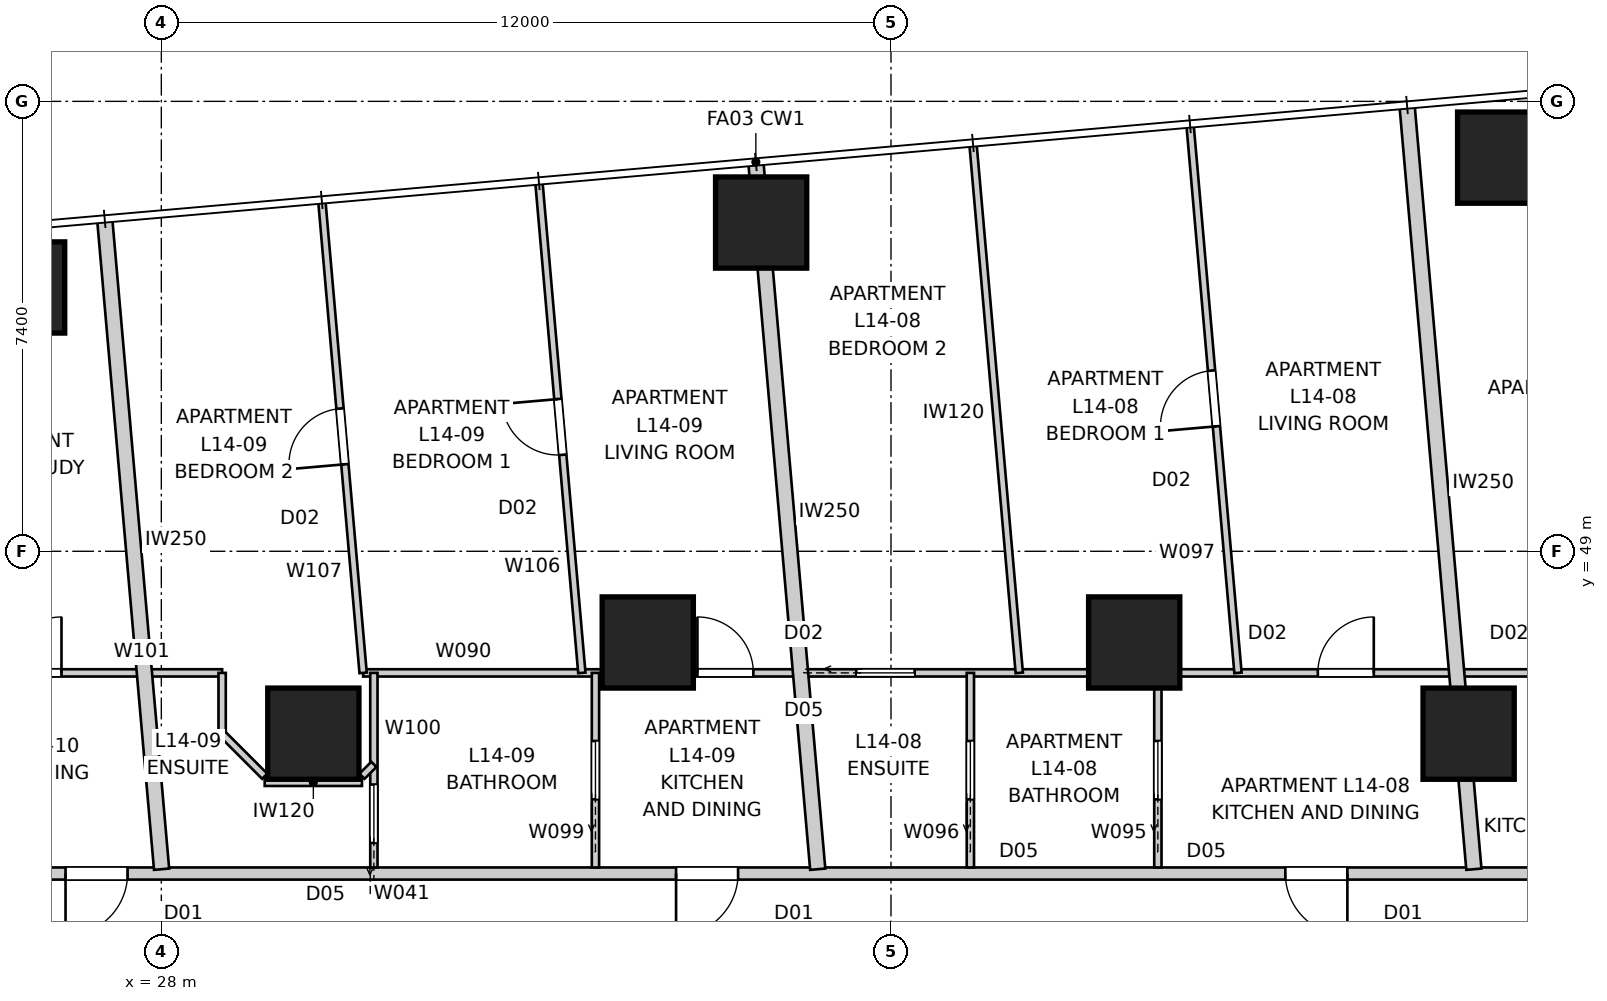
"""IFC4 building model, lengths in metres.
Left out: names, types, materials, properties, quantities, classifications, styles, units other than length and angle.
Written with IfcOpenShell. Run it as: python <this file> out.ifc"""

import sys

from ifc_helpers import new_model, si_unit, direction, frame, frame_2d, origin, origin_2d, place, context, subcontext, project, spatial, rectangle, extrude, element, fill, save


model = new_model("IFC4")
c1 = context("Model", 3, precision=1e-05, world=origin(), true_north=direction((0.0, 1.0)))
c2 = subcontext(c1, "Body", "Model", "MODEL_VIEW")
j1 = project(units=[si_unit("LENGTHUNIT", "METRE"), si_unit("PLANEANGLEUNIT", "RADIAN")], contexts=[c1])
p1 = place(None, origin())
s1 = spatial("IfcSite", under=j1, at=p1, CompositionType="ELEMENT")
p2 = place(p1, origin())
s2 = spatial("IfcBuilding", under=s1, at=p2, CompositionType="ELEMENT")
p3 = place(p2, frame((0.0, 0.0, 54.0)))
s3 = spatial("IfcBuildingStorey", under=s2, at=p3, CompositionType="ELEMENT", Elevation=54.0)
for number, where, z_axis, x_axis in (
    (1, (50.068, 55.474, 0.0), (0.0, 0.0, 1.0), (1.0, 0.0, 0.0)),
    (2, (37.865, 54.407, 0.0), (0.0, 0.0, 1.0), (1.0, 0.0, 0.0)),
    (3, (25.661, 53.339, 0.0), (0.0, 0.0, 1.0), (1.0, 0.0, 0.0)),
    (4, (49.5, 46.0, 0.0), (0.0, 0.0, 1.0), (1.0, 0.0, 0.0)),
    (5, (44.0, 47.5, 0.0), (0.0, 0.0, 1.0), (1.0, 0.0, 0.0)),
    (6, (36.0, 47.5, 0.0), (0.0, 0.0, 1.0), (1.0, 0.0, 0.0)),
    (7, (30.5, 46.0, 0.0), (0.0, 0.0, 1.0), (1.0, 0.0, 0.0)),
):
    element("IfcColumn", number, at=place(p3, frame(where, z_axis=z_axis, x_axis=x_axis)), inside=s3, PredefinedType="COLUMN", context=c2, shape_type="SweptSolid", body=[
        extrude(rectangle(XDim=1.5, YDim=1.5, at=origin_2d()), origin(), (0.0, 0.0, 1.0), 3.4),
    ])
p4 = place(p3, frame((53.7, 43.7, 0.0), z_axis=(0.0, 0.0, 1.0), x_axis=(-1.0, 0.0, 0.0)))
e8 = element("IfcWall", 8, at=p4, inside=s3, PredefinedType="PARTITIONING", context=c2, shape_type="SweptSolid", body=[
    extrude(rectangle(XDim=28.2, YDim=0.2, at=frame_2d((14.1, 0.0))), origin(), (0.0, 0.0, 1.0), 3.25),
])
p5 = place(p4, frame((6.194, 0.0, 0.0)))
e9 = element("IfcOpeningElement", 9, at=p5, cuts=e8, PredefinedType="OPENING", context=c2, shape_type="SweptSolid", body=[
    extrude(rectangle(XDim=1.02, YDim=2.34, at=frame_2d((0.51, 1.17))), frame((0.0, 0.11, 0.0), z_axis=(0.0, -1.0, 0.0), x_axis=(1.0, 0.0, 0.0)), (0.0, 0.0, 1.0), 0.22),
])
p6 = place(p4, frame((1.715, 0.0, 0.0)))
e10 = element("IfcOpeningElement", 10, at=p6, cuts=e8, PredefinedType="OPENING", context=c2, shape_type="SweptSolid", body=[
    extrude(rectangle(XDim=1.02, YDim=2.1, at=frame_2d((0.51, 1.05))), frame((0.0, 0.11, 0.0), z_axis=(0.0, -1.0, 0.0), x_axis=(1.0, 0.0, 0.0)), (0.0, 0.0, 1.0), 0.22),
])
p7 = place(p4, frame((16.215, 0.0, 0.0)))
e11 = element("IfcOpeningElement", 11, at=p7, cuts=e8, PredefinedType="OPENING", context=c2, shape_type="SweptSolid", body=[
    extrude(rectangle(XDim=1.02, YDim=2.34, at=frame_2d((0.51, 1.17))), frame((0.0, 0.11, 0.0), z_axis=(0.0, -1.0, 0.0), x_axis=(1.0, 0.0, 0.0)), (0.0, 0.0, 1.0), 0.22),
])
p8 = place(p4, frame((26.255, 0.0, 0.0)))
e12 = element("IfcOpeningElement", 12, at=p8, cuts=e8, PredefinedType="OPENING", context=c2, shape_type="SweptSolid", body=[
    extrude(rectangle(XDim=1.02, YDim=2.34, at=frame_2d((0.51, 1.17))), frame((0.0, 0.11, 0.0), z_axis=(0.0, -1.0, 0.0), x_axis=(1.0, 0.0, 0.0)), (0.0, 0.0, 1.0), 0.22),
])
p9 = place(p3, frame((37.778, 55.403, 0.0), z_axis=(0.0, 0.0, 1.0), x_axis=(0.087147497287, -0.996195419442, 0.0)))
e13 = element("IfcWall", 13, at=p9, inside=s3, PredefinedType="PARTITIONING", context=c2, shape_type="SweptSolid", body=[
    extrude(rectangle(XDim=11.677, YDim=0.25, at=frame_2d((5.838, 0.0))), origin(), (0.0, 0.0, 1.0), 3.25),
])
p10 = place(p3, frame((48.487, 56.34, 0.0), z_axis=(0.0, 0.0, 1.0), x_axis=(0.087153988028, -0.996194851608, 0.0)))
e14 = element("IfcWall", 14, at=p10, inside=s3, PredefinedType="PARTITIONING", context=c2, shape_type="SweptSolid", body=[
    extrude(rectangle(XDim=12.617, YDim=0.25, at=frame_2d((6.309, 0.0))), origin(), (0.0, 0.0, 1.0), 3.25),
])
p11 = place(p3, frame((27.068, 54.466, 0.0), z_axis=(0.0, 0.0, 1.0), x_axis=(0.08716441141, -0.996193939644, 0.0)))
e15 = element("IfcWall", 15, at=p11, inside=s3, PredefinedType="PARTITIONING", context=c2, shape_type="SweptSolid", body=[
    extrude(rectangle(XDim=10.736, YDim=0.25, at=frame_2d((5.368, 0.0))), origin(), (0.0, 0.0, 1.0), 3.25),
])
p12 = place(p3, frame((31.319, 47.0, 0.0), z_axis=(0.0, 0.0, 1.0), x_axis=(1.0, 0.0, 0.0)))
e16 = element("IfcWall", 16, at=p12, inside=s3, PredefinedType="PARTITIONING", context=c2, shape_type="SweptSolid", body=[
    extrude(rectangle(XDim=25.681, YDim=0.12, at=frame_2d((12.841, 0.0))), origin(), (0.0, 0.0, 1.0), 2.55),
])
p13 = place(p12, frame((15.701, 0.0, 0.0)))
e17 = element("IfcOpeningElement", 17, at=p13, cuts=e16, PredefinedType="OPENING", context=c2, shape_type="SweptSolid", body=[
    extrude(rectangle(XDim=0.92, YDim=2.34, at=frame_2d((0.46, 1.17))), frame((0.0, 0.07, 0.0), z_axis=(0.0, -1.0, 0.0), x_axis=(1.0, 0.0, 0.0)), (0.0, 0.0, 1.0), 0.14),
])
p14 = place(p12, frame((19.676, 0.0, 0.0)))
e18 = element("IfcOpeningElement", 18, at=p14, cuts=e16, PredefinedType="OPENING", context=c2, shape_type="SweptSolid", body=[
    extrude(rectangle(XDim=0.92, YDim=2.34, at=frame_2d((0.46, 1.17))), frame((0.0, 0.07, 0.0), z_axis=(0.0, -1.0, 0.0), x_axis=(1.0, 0.0, 0.0)), (0.0, 0.0, 1.0), 0.14),
])
p15 = place(p12, frame((5.498, 0.0, 0.0)))
e19 = element("IfcOpeningElement", 19, at=p15, cuts=e16, PredefinedType="OPENING", context=c2, shape_type="SweptSolid", body=[
    extrude(rectangle(XDim=0.92, YDim=2.34, at=frame_2d((0.46, 1.17))), frame((0.0, 0.07, 0.0), z_axis=(0.0, -1.0, 0.0), x_axis=(1.0, 0.0, 0.0)), (0.0, 0.0, 1.0), 0.14),
])
p16 = place(p12, frame((8.11, 0.0, 0.0)))
e20 = element("IfcOpeningElement", 20, at=p16, cuts=e16, PredefinedType="OPENING", context=c2, shape_type="SweptSolid", body=[
    extrude(rectangle(XDim=0.96, YDim=2.1, at=frame_2d((0.48, 1.05))), frame((0.0, 0.07, 0.0), z_axis=(0.0, -1.0, 0.0), x_axis=(1.0, 0.0, 0.0)), (0.0, 0.0, 1.0), 0.14),
])
p17 = place(p3, frame((44.389, 43.8, 0.0), z_axis=(0.0, 0.0, 1.0), x_axis=(0.0, 1.0, 0.0)))
e21 = element("IfcWall", 21, at=p17, inside=s3, PredefinedType="PARTITIONING", context=c2, shape_type="SweptSolid", body=[
    extrude(rectangle(XDim=3.2, YDim=0.12, at=frame_2d((1.6, 0.0))), origin(), (0.0, 0.0, 1.0), 3.25),
])
p18 = place(p17, frame((1.12, 0.0, 0.0)))
e22 = element("IfcOpeningElement", 22, at=p18, cuts=e21, PredefinedType="OPENING", context=c2, shape_type="SweptSolid", body=[
    extrude(rectangle(XDim=0.96, YDim=2.1, at=frame_2d((0.48, 1.05))), frame((0.0, 0.07, 0.0), z_axis=(0.0, -1.0, 0.0), x_axis=(1.0, 0.0, 0.0)), (0.0, 0.0, 1.0), 0.14),
])
p19 = place(p3, frame((41.305, 43.8, 0.0), z_axis=(0.0, 0.0, 1.0), x_axis=(0.0, 1.0, 0.0)))
e23 = element("IfcWall", 23, at=p19, inside=s3, PredefinedType="PARTITIONING", context=c2, shape_type="SweptSolid", body=[
    extrude(rectangle(XDim=3.2, YDim=0.12, at=frame_2d((1.6, 0.0))), origin(), (0.0, 0.0, 1.0), 3.25),
])
p20 = place(p19, frame((1.12, 0.0, 0.0)))
e24 = element("IfcOpeningElement", 24, at=p20, cuts=e23, PredefinedType="OPENING", context=c2, shape_type="SweptSolid", body=[
    extrude(rectangle(XDim=0.96, YDim=2.1, at=frame_2d((0.48, 1.05))), frame((0.0, 0.07, 0.0), z_axis=(0.0, -1.0, 0.0), x_axis=(1.0, 0.0, 0.0)), (0.0, 0.0, 1.0), 0.14),
])
p21 = place(p3, frame((45.707, 47.0, 0.0), z_axis=(0.0, 0.0, 1.0), x_axis=(-0.087160907995, 0.996194246178, 0.0)))
e25 = element("IfcWall", 25, at=p21, inside=s3, PredefinedType="PARTITIONING", context=c2, shape_type="SweptSolid", body=[
    extrude(rectangle(XDim=9.022, YDim=0.12, at=frame_2d((4.511, 0.0))), origin(), (0.0, 0.0, 1.0), 3.25),
])
p22 = place(p21, frame((4.071, 0.0, 0.0)))
e26 = element("IfcOpeningElement", 26, at=p22, cuts=e25, PredefinedType="OPENING", context=c2, shape_type="SweptSolid", body=[
    extrude(rectangle(XDim=0.92, YDim=2.34, at=frame_2d((0.46, 1.17))), frame((0.0, 0.07, 0.0), z_axis=(0.0, -1.0, 0.0), x_axis=(1.0, 0.0, 0.0)), (0.0, 0.0, 1.0), 0.14),
])
p23 = place(p3, frame((42.11, 47.0, 0.0), z_axis=(0.0, 0.0, 1.0), x_axis=(-0.087158256162, 0.996194478193, 0.0)))
e27 = element("IfcWall", 27, at=p23, inside=s3, PredefinedType="PARTITIONING", context=c2, shape_type="SweptSolid", body=[
    extrude(rectangle(XDim=8.709, YDim=0.12, at=frame_2d((4.354, 0.0))), origin(), (0.0, 0.0, 1.0), 3.25),
])
p24 = place(p3, frame((35.14, 43.8, 0.0), z_axis=(0.0, 0.0, 1.0), x_axis=(0.0, 1.0, 0.0)))
e28 = element("IfcWall", 28, at=p24, inside=s3, PredefinedType="PARTITIONING", context=c2, shape_type="SweptSolid", body=[
    extrude(rectangle(XDim=3.2, YDim=0.12, at=frame_2d((1.6, 0.0))), origin(), (0.0, 0.0, 1.0), 3.25),
])
p25 = place(p24, frame((1.12, 0.0, 0.0)))
e29 = element("IfcOpeningElement", 29, at=p25, cuts=e28, PredefinedType="OPENING", context=c2, shape_type="SweptSolid", body=[
    extrude(rectangle(XDim=0.96, YDim=2.1, at=frame_2d((0.48, 1.05))), frame((0.0, 0.07, 0.0), z_axis=(0.0, -1.0, 0.0), x_axis=(1.0, 0.0, 0.0)), (0.0, 0.0, 1.0), 0.14),
])
p26 = place(p3, frame((31.496, 43.8, 0.0), z_axis=(0.0, 0.0, 1.0), x_axis=(0.0, 1.0, 0.0)))
e30 = element("IfcWall", 30, at=p26, inside=s3, PredefinedType="PARTITIONING", context=c2, shape_type="SweptSolid", body=[
    extrude(rectangle(XDim=3.2, YDim=0.12, at=frame_2d((1.6, 0.0))), origin(), (0.0, 0.0, 1.0), 3.25),
])
p27 = place(p26, frame((0.403, 0.0, 0.0)))
e31 = element("IfcOpeningElement", 31, at=p27, cuts=e30, PredefinedType="OPENING", context=c2, shape_type="SweptSolid", body=[
    extrude(rectangle(XDim=0.96, YDim=2.1, at=frame_2d((0.48, 1.05))), frame((0.0, 0.07, 0.0), z_axis=(0.0, -1.0, 0.0), x_axis=(1.0, 0.0, 0.0)), (0.0, 0.0, 1.0), 0.14),
])
p28 = place(p3, frame((23.0, 47.0, 0.0), z_axis=(0.0, 0.0, 1.0), x_axis=(1.0, 0.0, 0.0)))
e32 = element("IfcWall", 32, at=p28, inside=s3, PredefinedType="PARTITIONING", context=c2, shape_type="SweptSolid", body=[
    extrude(rectangle(XDim=6.0, YDim=0.12, at=frame_2d((3.0, 0.0))), origin(), (0.0, 0.0, 1.0), 3.25),
])
p29 = place(p28, frame((2.438, 0.0, 0.0)))
e33 = element("IfcOpeningElement", 33, at=p29, cuts=e32, PredefinedType="OPENING", context=c2, shape_type="SweptSolid", body=[
    extrude(rectangle(XDim=0.92, YDim=2.34, at=frame_2d((0.46, 1.17))), frame((0.0, 0.07, 0.0), z_axis=(0.0, -1.0, 0.0), x_axis=(1.0, 0.0, 0.0)), (0.0, 0.0, 1.0), 0.14),
])
p30 = place(p3, frame((29.0, 47.0, 0.0), z_axis=(0.0, 0.0, 1.0), x_axis=(0.0, -1.0, 0.0)))
e34 = element("IfcWall", 34, at=p30, inside=s3, PredefinedType="PARTITIONING", context=c2, shape_type="SweptSolid", body=[
    extrude(rectangle(XDim=1.0, YDim=0.12, at=frame_2d((0.5, 0.0))), origin(), (0.0, 0.0, 1.0), 3.25),
])
p31 = place(p3, frame((29.0, 46.0, 0.0), z_axis=(0.0, 0.0, 1.0), x_axis=(0.707106781187, -0.707106781187, 0.0)))
e35 = element("IfcWall", 35, at=p31, inside=s3, PredefinedType="PARTITIONING", context=c2, shape_type="SweptSolid", body=[
    extrude(rectangle(XDim=0.99, YDim=0.12, at=frame_2d((0.495, 0.0))), origin(), (0.0, 0.0, 1.0), 3.25),
])
p32 = place(p3, frame((29.7, 45.2, 0.0), z_axis=(0.0, 0.0, 1.0), x_axis=(1.0, 0.0, 0.0)))
e36 = element("IfcWall", 36, at=p32, inside=s3, PredefinedType="PARTITIONING", context=c2, shape_type="SweptSolid", body=[
    extrude(rectangle(XDim=1.6, YDim=0.12, at=frame_2d((0.8, 0.0))), origin(), (0.0, 0.0, 1.0), 3.25),
])
p33 = place(p3, frame((31.3, 45.3, 0.0), z_axis=(0.0, 0.0, 1.0), x_axis=(0.707106781187, 0.707106781187, 0.0)))
e37 = element("IfcWall", 37, at=p33, inside=s3, PredefinedType="PARTITIONING", context=c2, shape_type="SweptSolid", body=[
    extrude(rectangle(XDim=0.277, YDim=0.12, at=frame_2d((0.138, 0.0))), origin(), (0.0, 0.0, 1.0), 3.25),
])
p34 = place(p3, frame((34.916, 47.0, 0.0), z_axis=(0.0, 0.0, 1.0), x_axis=(-0.087184938313, 0.99619214338, 0.0)))
e38 = element("IfcWall", 38, at=p34, inside=s3, PredefinedType="PARTITIONING", context=c2, shape_type="SweptSolid", body=[
    extrude(rectangle(XDim=8.082, YDim=0.12, at=frame_2d((4.041, 0.0))), origin(), (0.0, 0.0, 1.0), 3.25),
])
p35 = place(p34, frame((3.601, 0.0, 0.0)))
e39 = element("IfcOpeningElement", 39, at=p35, cuts=e38, PredefinedType="OPENING", context=c2, shape_type="SweptSolid", body=[
    extrude(rectangle(XDim=0.92, YDim=2.34, at=frame_2d((0.46, 1.17))), frame((0.0, 0.07, 0.0), z_axis=(0.0, -1.0, 0.0), x_axis=(1.0, 0.0, 0.0)), (0.0, 0.0, 1.0), 0.14),
])
p36 = place(p3, frame((31.319, 47.0, 0.0), z_axis=(0.0, 0.0, 1.0), x_axis=(-0.0871517452, 0.996195047824, 0.0)))
e40 = element("IfcWall", 40, at=p36, inside=s3, PredefinedType="PARTITIONING", context=c2, shape_type="SweptSolid", body=[
    extrude(rectangle(XDim=7.768, YDim=0.12, at=frame_2d((3.884, 0.0))), origin(), (0.0, 0.0, 1.0), 3.25),
])
p37 = place(p36, frame((3.444, 0.0, 0.0)))
e41 = element("IfcOpeningElement", 41, at=p37, cuts=e40, PredefinedType="OPENING", context=c2, shape_type="SweptSolid", body=[
    extrude(rectangle(XDim=0.92, YDim=2.34, at=frame_2d((0.46, 1.17))), frame((0.0, 0.07, 0.0), z_axis=(0.0, -1.0, 0.0), x_axis=(1.0, 0.0, 0.0)), (0.0, 0.0, 1.0), 0.14),
])
p38 = place(p5, origin())
e42 = element("IfcDoor", 42, at=p38, inside=s3, OperationType="SINGLE_SWING_LEFT", PredefinedType="DOOR", context=c2, shape_type="SweptSolid", body=[
    extrude(rectangle(XDim=1.02, YDim=2.34, at=frame_2d((0.51, 1.17))), frame((0.0, 0.025, 0.0), z_axis=(0.0, -1.0, 0.0), x_axis=(1.0, 0.0, 0.0)), (0.0, 0.0, 1.0), 0.05),
])
fill(e9, e42)
p39 = place(p7, origin())
e43 = element("IfcDoor", 43, at=p39, inside=s3, OperationType="SINGLE_SWING_RIGHT", PredefinedType="DOOR", context=c2, shape_type="SweptSolid", body=[
    extrude(rectangle(XDim=1.02, YDim=2.34, at=frame_2d((0.51, 1.17))), frame((0.0, 0.025, 0.0), z_axis=(0.0, -1.0, 0.0), x_axis=(1.0, 0.0, 0.0)), (0.0, 0.0, 1.0), 0.05),
])
fill(e11, e43)
p40 = place(p8, origin())
e44 = element("IfcDoor", 44, at=p40, inside=s3, OperationType="SINGLE_SWING_RIGHT", PredefinedType="DOOR", context=c2, shape_type="SweptSolid", body=[
    extrude(rectangle(XDim=1.02, YDim=2.34, at=frame_2d((0.51, 1.17))), frame((0.0, 0.025, 0.0), z_axis=(0.0, -1.0, 0.0), x_axis=(1.0, 0.0, 0.0)), (0.0, 0.0, 1.0), 0.05),
])
fill(e12, e44)
p41 = place(p13, origin())
e45 = element("IfcDoor", 45, at=p41, inside=s3, OperationType="SINGLE_SWING_RIGHT", PredefinedType="DOOR", context=c2, shape_type="SweptSolid", body=[
    extrude(rectangle(XDim=0.92, YDim=2.34, at=frame_2d((0.46, 1.17))), frame((0.0, 0.025, 0.0), z_axis=(0.0, -1.0, 0.0), x_axis=(1.0, 0.0, 0.0)), (0.0, 0.0, 1.0), 0.05),
])
fill(e17, e45)
p42 = place(p18, origin())
e46 = element("IfcDoor", 46, at=p42, inside=s3, OperationType="SLIDING_TO_LEFT", PredefinedType="DOOR", context=c2, shape_type="SweptSolid", body=[
    extrude(rectangle(XDim=0.96, YDim=2.1, at=frame_2d((0.48, 1.05))), frame((0.0, 0.025, 0.0), z_axis=(0.0, -1.0, 0.0), x_axis=(1.0, 0.0, 0.0)), (0.0, 0.0, 1.0), 0.05),
])
fill(e22, e46)
p43 = place(p15, origin())
e47 = element("IfcDoor", 47, at=p43, inside=s3, OperationType="SINGLE_SWING_LEFT", PredefinedType="DOOR", context=c2, shape_type="SweptSolid", body=[
    extrude(rectangle(XDim=0.92, YDim=2.34, at=frame_2d((0.46, 1.17))), frame((0.0, 0.025, 0.0), z_axis=(0.0, -1.0, 0.0), x_axis=(1.0, 0.0, 0.0)), (0.0, 0.0, 1.0), 0.05),
])
fill(e19, e47)
p44 = place(p25, origin())
e48 = element("IfcDoor", 48, at=p44, inside=s3, OperationType="SLIDING_TO_LEFT", PredefinedType="DOOR", context=c2, shape_type="SweptSolid", body=[
    extrude(rectangle(XDim=0.96, YDim=2.1, at=frame_2d((0.48, 1.05))), frame((0.0, 0.025, 0.0), z_axis=(0.0, -1.0, 0.0), x_axis=(1.0, 0.0, 0.0)), (0.0, 0.0, 1.0), 0.05),
])
fill(e29, e48)
p45 = place(p29, origin())
e49 = element("IfcDoor", 49, at=p45, inside=s3, OperationType="SINGLE_SWING_RIGHT", PredefinedType="DOOR", context=c2, shape_type="SweptSolid", body=[
    extrude(rectangle(XDim=0.92, YDim=2.34, at=frame_2d((0.46, 1.17))), frame((0.0, 0.025, 0.0), z_axis=(0.0, -1.0, 0.0), x_axis=(1.0, 0.0, 0.0)), (0.0, 0.0, 1.0), 0.05),
])
fill(e33, e49)
p46 = place(p22, origin())
e50 = element("IfcDoor", 50, at=p46, inside=s3, OperationType="SINGLE_SWING_LEFT", PredefinedType="DOOR", context=c2, shape_type="SweptSolid", body=[
    extrude(rectangle(XDim=0.92, YDim=2.34, at=frame_2d((0.46, 1.17))), frame((0.0, 0.025, 0.0), z_axis=(0.0, -1.0, 0.0), x_axis=(1.0, 0.0, 0.0)), (0.0, 0.0, 1.0), 0.05),
])
fill(e26, e50)
p47 = place(p20, origin())
e51 = element("IfcDoor", 51, at=p47, inside=s3, OperationType="SLIDING_TO_LEFT", PredefinedType="DOOR", context=c2, shape_type="SweptSolid", body=[
    extrude(rectangle(XDim=0.96, YDim=2.1, at=frame_2d((0.48, 1.05))), frame((0.0, 0.025, 0.0), z_axis=(0.0, -1.0, 0.0), x_axis=(1.0, 0.0, 0.0)), (0.0, 0.0, 1.0), 0.05),
])
fill(e24, e51)
p48 = place(p35, origin())
e52 = element("IfcDoor", 52, at=p48, inside=s3, OperationType="SINGLE_SWING_RIGHT", PredefinedType="DOOR", context=c2, shape_type="SweptSolid", body=[
    extrude(rectangle(XDim=0.92, YDim=2.34, at=frame_2d((0.46, 1.17))), frame((0.0, 0.025, 0.0), z_axis=(0.0, -1.0, 0.0), x_axis=(1.0, 0.0, 0.0)), (0.0, 0.0, 1.0), 0.05),
])
fill(e39, e52)
p49 = place(p27, origin())
e53 = element("IfcDoor", 53, at=p49, inside=s3, OperationType="SLIDING_TO_LEFT", PredefinedType="DOOR", context=c2, shape_type="SweptSolid", body=[
    extrude(rectangle(XDim=0.96, YDim=2.1, at=frame_2d((0.48, 1.05))), frame((0.0, 0.025, 0.0), z_axis=(0.0, -1.0, 0.0), x_axis=(1.0, 0.0, 0.0)), (0.0, 0.0, 1.0), 0.05),
])
fill(e31, e53)
p50 = place(p16, origin())
e54 = element("IfcDoor", 54, at=p50, inside=s3, OperationType="SLIDING_TO_LEFT", PredefinedType="DOOR", context=c2, shape_type="SweptSolid", body=[
    extrude(rectangle(XDim=0.96, YDim=2.1, at=frame_2d((0.48, 1.05))), frame((0.0, 0.025, 0.0), z_axis=(0.0, -1.0, 0.0), x_axis=(1.0, 0.0, 0.0)), (0.0, 0.0, 1.0), 0.05),
])
fill(e20, e54)
p51 = place(p37, origin())
e55 = element("IfcDoor", 55, at=p51, inside=s3, OperationType="SINGLE_SWING_LEFT", PredefinedType="DOOR", context=c2, shape_type="SweptSolid", body=[
    extrude(rectangle(XDim=0.92, YDim=2.34, at=frame_2d((0.46, 1.17))), frame((0.0, 0.025, 0.0), z_axis=(0.0, -1.0, 0.0), x_axis=(1.0, 0.0, 0.0)), (0.0, 0.0, 1.0), 0.05),
])
fill(e41, e55)
save(model, sys.argv[1])
